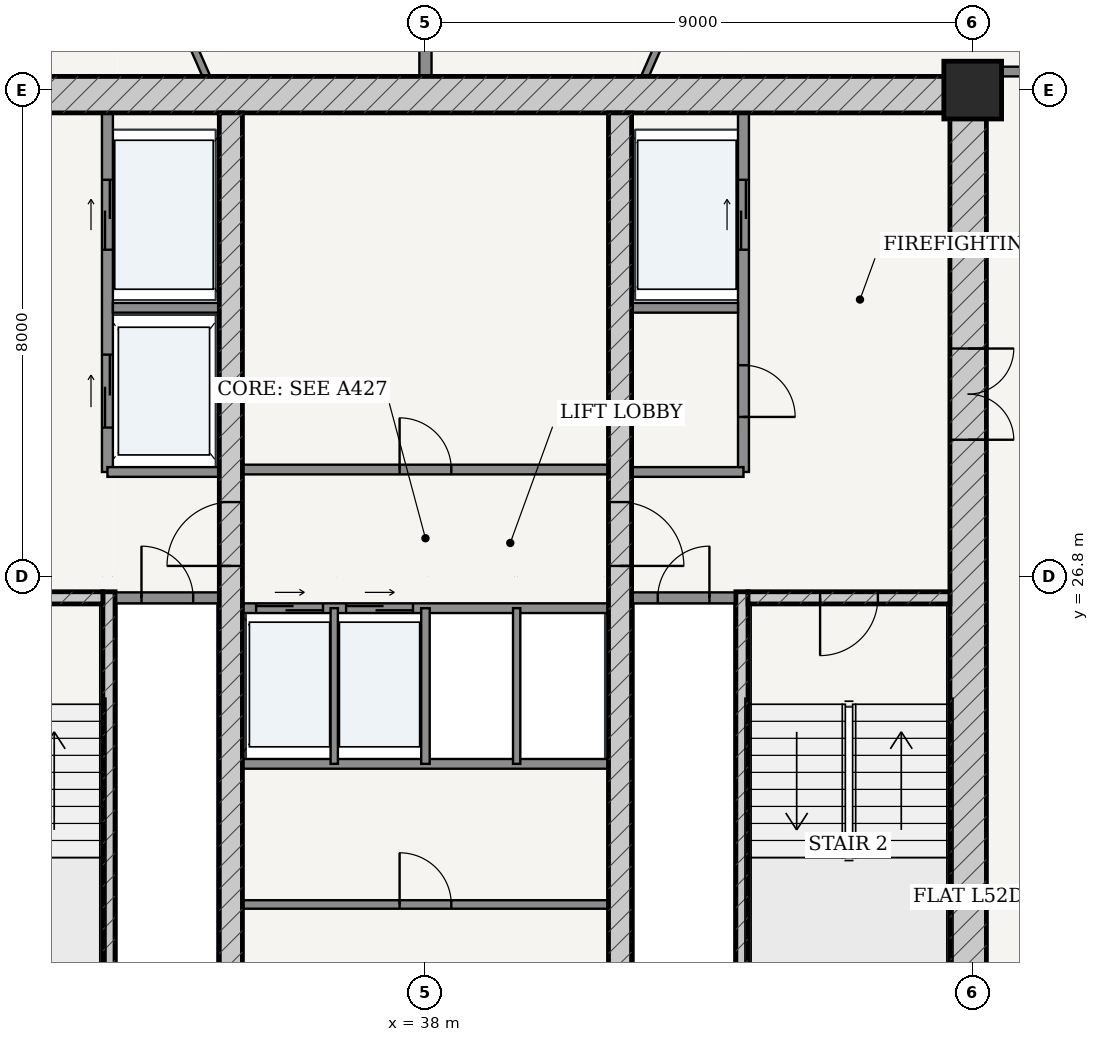
"""IFC4 building model, lengths in metres.
Left out: names, types, materials, properties, quantities, classifications, styles, units other than length and angle.
Written with IfcOpenShell. Run it as: python <this file> out.ifc"""

import sys

from ifc_helpers import new_model, si_unit, direction, frame, frame_2d, origin, origin_2d, place, context, subcontext, project, spatial, rectangle, extrude, source, transform, mapped, element, fill, save


model = new_model("IFC4")
c1 = context("Model", 3, precision=1e-05, world=origin(), true_north=direction((-0.2419218956, 0.970295726276)))
c2 = subcontext(c1, "Body", "Model", "MODEL_VIEW")
j1 = project(units=[si_unit("LENGTHUNIT", "METRE"), si_unit("PLANEANGLEUNIT", "RADIAN")], contexts=[c1])
p1 = place(None, origin())
s1 = spatial("IfcSite", under=j1, at=p1, CompositionType="ELEMENT")
p2 = place(p1, origin())
s2 = spatial("IfcBuilding", under=s1, at=p2, CompositionType="ELEMENT")
p3 = place(p2, frame((0.0, 0.0, 198.6)))
s3 = spatial("IfcBuildingStorey", under=s2, at=p3, CompositionType="ELEMENT", Elevation=198.6)
p4 = place(p3, frame((47.0, 34.8, 0.0), z_axis=(0.0, 0.0, 1.0), x_axis=(1.0, 0.0, 0.0)))
e1 = element("IfcColumn", 1, at=p4, inside=s3, PredefinedType="COLUMN", context=c2, shape_type="SweptSolid", body=[
    extrude(rectangle(XDim=0.95, YDim=0.95, at=origin_2d()), origin(), (0.0, 0.0, 1.0), 3.7),
])
p5 = place(p3, frame((28.775, 34.725, 0.0), z_axis=(0.0, 0.0, 1.0), x_axis=(1.0, 0.0, 0.0)))
e2 = element("IfcWall", 2, at=p5, inside=s3, PredefinedType="SHEAR", context=c2, shape_type="SweptSolid", body=[
    extrude(rectangle(XDim=18.45, YDim=0.6, at=frame_2d((9.225, 0.0))), origin(), (0.0, 0.0, 1.0), 3.435),
])
p6 = place(p3, frame((46.925, 19.175, 0.0), z_axis=(0.0, 0.0, 1.0), x_axis=(0.0, 1.0, 0.0)))
e3 = element("IfcWall", 3, at=p6, inside=s3, PredefinedType="SHEAR", context=c2, shape_type="SweptSolid", body=[
    extrude(rectangle(XDim=15.25, YDim=0.6, at=frame_2d((7.625, 0.0))), origin(), (0.0, 0.0, 1.0), 3.435),
])
p7 = place(p6, frame((9.875, 0.0, 0.0)))
e4 = element("IfcOpeningElement", 4, at=p7, cuts=e3, PredefinedType="OPENING", context=c2, shape_type="SweptSolid", body=[
    extrude(rectangle(XDim=1.5, YDim=2.2, at=frame_2d((0.75, 1.1))), frame((0.0, 0.31, 0.0), z_axis=(0.0, -1.0, 0.0), x_axis=(1.0, 0.0, 0.0)), (0.0, 0.0, 1.0), 0.62),
])
p8 = place(p3, frame((32.795, 19.175, 0.0), z_axis=(0.0, 0.0, 1.0), x_axis=(0.0, 1.0, 0.0)))
e5 = element("IfcWall", 5, at=p8, inside=s3, PredefinedType="SOLIDWALL", context=c2, shape_type="SweptSolid", body=[
    extrude(rectangle(XDim=7.375, YDim=0.2, at=frame_2d((3.688, 0.0))), origin(), (0.0, 0.0, 1.0), 3.435),
])
p9 = place(p3, frame((29.375, 26.45, 0.0), z_axis=(0.0, 0.0, 1.0), x_axis=(1.0, 0.0, 0.0)))
e6 = element("IfcWall", 6, at=p9, inside=s3, PredefinedType="SOLIDWALL", context=c2, shape_type="SweptSolid", body=[
    extrude(rectangle(XDim=3.32, YDim=0.2, at=frame_2d((1.66, 0.0))), origin(), (0.0, 0.0, 1.0), 3.435),
])
p10 = place(p9, frame((1.185, 0.0, 0.0)))
e7 = element("IfcOpeningElement", 7, at=p10, cuts=e6, PredefinedType="OPENING", context=c2, shape_type="SweptSolid", body=[
    extrude(rectangle(XDim=0.95, YDim=2.15, at=frame_2d((0.475, 1.075))), frame((0.0, 0.11, 0.0), z_axis=(0.0, -1.0, 0.0), x_axis=(1.0, 0.0, 0.0)), (0.0, 0.0, 1.0), 0.22),
])
p11 = place(p3, frame((43.205, 19.175, 0.0), z_axis=(0.0, 0.0, 1.0), x_axis=(0.0, 1.0, 0.0)))
e8 = element("IfcWall", 8, at=p11, inside=s3, PredefinedType="SOLIDWALL", context=c2, shape_type="SweptSolid", body=[
    extrude(rectangle(XDim=7.375, YDim=0.2, at=frame_2d((3.688, 0.0))), origin(), (0.0, 0.0, 1.0), 3.435),
])
p12 = place(p3, frame((43.305, 26.45, 0.0), z_axis=(0.0, 0.0, 1.0), x_axis=(1.0, 0.0, 0.0)))
e9 = element("IfcWall", 9, at=p12, inside=s3, PredefinedType="SOLIDWALL", context=c2, shape_type="SweptSolid", body=[
    extrude(rectangle(XDim=3.32, YDim=0.2, at=frame_2d((1.66, 0.0))), origin(), (0.0, 0.0, 1.0), 3.435),
])
p13 = place(p12, frame((1.185, 0.0, 0.0)))
e10 = element("IfcOpeningElement", 10, at=p13, cuts=e9, PredefinedType="OPENING", context=c2, shape_type="SweptSolid", body=[
    extrude(rectangle(XDim=0.95, YDim=2.15, at=frame_2d((0.475, 1.075))), frame((0.0, 0.11, 0.0), z_axis=(0.0, -1.0, 0.0), x_axis=(1.0, 0.0, 0.0)), (0.0, 0.0, 1.0), 0.22),
])
p14 = place(p3, frame((34.8, 19.175, 0.0), z_axis=(0.0, 0.0, 1.0), x_axis=(0.0, 1.0, 0.0)))
e11 = element("IfcWall", 11, at=p14, inside=s3, PredefinedType="SHEAR", context=c2, shape_type="SweptSolid", body=[
    extrude(rectangle(XDim=15.25, YDim=0.38, at=frame_2d((7.625, 0.0))), origin(), (0.0, 0.0, 1.0), 3.435),
])
p15 = place(p14, frame((7.8, 0.0, 0.0)))
e12 = element("IfcOpeningElement", 12, at=p15, cuts=e11, PredefinedType="OPENING", context=c2, shape_type="SweptSolid", body=[
    extrude(rectangle(XDim=1.05, YDim=2.15, at=frame_2d((0.525, 1.075))), frame((0.0, 0.2, 0.0), z_axis=(0.0, -1.0, 0.0), x_axis=(1.0, 0.0, 0.0)), (0.0, 0.0, 1.0), 0.4),
])
p16 = place(p3, frame((41.2, 19.175, 0.0), z_axis=(0.0, 0.0, 1.0), x_axis=(0.0, 1.0, 0.0)))
e13 = element("IfcWall", 13, at=p16, inside=s3, PredefinedType="SHEAR", context=c2, shape_type="SweptSolid", body=[
    extrude(rectangle(XDim=15.25, YDim=0.38, at=frame_2d((7.625, 0.0))), origin(), (0.0, 0.0, 1.0), 3.435),
])
p17 = place(p16, frame((7.8, 0.0, 0.0)))
e14 = element("IfcOpeningElement", 14, at=p17, cuts=e13, PredefinedType="OPENING", context=c2, shape_type="SweptSolid", body=[
    extrude(rectangle(XDim=1.05, YDim=2.15, at=frame_2d((0.525, 1.075))), frame((0.0, 0.2, 0.0), z_axis=(0.0, -1.0, 0.0), x_axis=(1.0, 0.0, 0.0)), (0.0, 0.0, 1.0), 0.4),
])
p18 = place(p3, frame((32.9, 26.45, 0.0), z_axis=(0.0, 0.0, 1.0), x_axis=(1.0, 0.0, 0.0)))
e15 = element("IfcWall", 15, at=p18, inside=s3, PredefinedType="PARTITIONING", context=c2, shape_type="SweptSolid", body=[
    extrude(rectangle(XDim=1.71, YDim=0.18, at=frame_2d((0.855, 0.0))), origin(), (0.0, 0.0, 1.0), 3.435),
])
p19 = place(p18, frame((0.43, 0.0, 0.0)))
e16 = element("IfcOpeningElement", 16, at=p19, cuts=e15, PredefinedType="OPENING", context=c2, shape_type="SweptSolid", body=[
    extrude(rectangle(XDim=0.85, YDim=2.1, at=frame_2d((0.425, 1.05))), frame((0.0, 0.1, 0.0), z_axis=(0.0, -1.0, 0.0), x_axis=(1.0, 0.0, 0.0)), (0.0, 0.0, 1.0), 0.2),
])
p20 = place(p3, frame((41.39, 26.45, 0.0), z_axis=(0.0, 0.0, 1.0), x_axis=(1.0, 0.0, 0.0)))
e17 = element("IfcWall", 17, at=p20, inside=s3, PredefinedType="PARTITIONING", context=c2, shape_type="SweptSolid", body=[
    extrude(rectangle(XDim=1.71, YDim=0.18, at=frame_2d((0.855, 0.0))), origin(), (0.0, 0.0, 1.0), 3.435),
])
p21 = place(p20, frame((0.43, 0.0, 0.0)))
e18 = element("IfcOpeningElement", 18, at=p21, cuts=e17, PredefinedType="OPENING", context=c2, shape_type="SweptSolid", body=[
    extrude(rectangle(XDim=0.85, YDim=2.1, at=frame_2d((0.425, 1.05))), frame((0.0, 0.1, 0.0), z_axis=(0.0, -1.0, 0.0), x_axis=(1.0, 0.0, 0.0)), (0.0, 0.0, 1.0), 0.2),
])
p22 = place(p3, frame((32.77, 28.52, 0.0), z_axis=(0.0, 0.0, 1.0), x_axis=(0.0, 1.0, 0.0)))
e19 = element("IfcWall", 19, at=p22, inside=s3, PredefinedType="PARTITIONING", context=c2, shape_type="SweptSolid", body=[
    extrude(rectangle(XDim=5.905, YDim=0.18, at=frame_2d((2.953, 0.0))), origin(), (0.0, 0.0, 1.0), 3.435),
])
p23 = place(p22, frame((3.655, 0.0, 0.0)))
e20 = element("IfcOpeningElement", 20, at=p23, cuts=e19, PredefinedType="OPENING", context=c2, shape_type="SweptSolid", body=[
    extrude(rectangle(XDim=1.15, YDim=2.2, at=frame_2d((0.575, 1.1))), frame((0.0, 0.1, 0.0), z_axis=(0.0, -1.0, 0.0), x_axis=(1.0, 0.0, 0.0)), (0.0, 0.0, 1.0), 0.2),
])
p24 = place(p22, frame((0.73, 0.0, 0.0)))
e21 = element("IfcOpeningElement", 21, at=p24, cuts=e19, PredefinedType="OPENING", context=c2, shape_type="SweptSolid", body=[
    extrude(rectangle(XDim=1.2, YDim=2.25, at=frame_2d((0.6, 1.125))), frame((0.0, 0.1, 0.0), z_axis=(0.0, -1.0, 0.0), x_axis=(1.0, 0.0, 0.0)), (0.0, 0.0, 1.0), 0.2),
])
p25 = place(p3, frame((32.86, 31.22, 0.0), z_axis=(0.0, 0.0, 1.0), x_axis=(1.0, 0.0, 0.0)))
e22 = element("IfcWall", 22, at=p25, inside=s3, PredefinedType="PARTITIONING", context=c2, shape_type="SweptSolid", body=[
    extrude(rectangle(XDim=1.75, YDim=0.16, at=frame_2d((0.875, 0.0))), origin(), (0.0, 0.0, 1.0), 3.435),
])
p26 = place(p3, frame((32.77, 28.52, 0.0), z_axis=(0.0, 0.0, 1.0), x_axis=(1.0, 0.0, 0.0)))
e23 = element("IfcWall", 23, at=p26, inside=s3, PredefinedType="PARTITIONING", context=c2, shape_type="SweptSolid", body=[
    extrude(rectangle(XDim=1.84, YDim=0.16, at=frame_2d((0.92, 0.0))), origin(), (0.0, 0.0, 1.0), 3.435),
])
p27 = place(p3, frame((43.23, 28.52, 0.0), z_axis=(0.0, 0.0, 1.0), x_axis=(0.0, 1.0, 0.0)))
e24 = element("IfcWall", 24, at=p27, inside=s3, PredefinedType="PARTITIONING", context=c2, shape_type="SweptSolid", body=[
    extrude(rectangle(XDim=5.905, YDim=0.18, at=frame_2d((2.953, 0.0))), origin(), (0.0, 0.0, 1.0), 3.435),
])
p28 = place(p27, frame((0.905, 0.0, 0.0)))
e25 = element("IfcOpeningElement", 25, at=p28, cuts=e24, PredefinedType="OPENING", context=c2, shape_type="SweptSolid", body=[
    extrude(rectangle(XDim=0.85, YDim=2.1, at=frame_2d((0.425, 1.05))), frame((0.0, 0.1, 0.0), z_axis=(0.0, -1.0, 0.0), x_axis=(1.0, 0.0, 0.0)), (0.0, 0.0, 1.0), 0.2),
])
p29 = place(p27, frame((3.655, 0.0, 0.0)))
e26 = element("IfcOpeningElement", 26, at=p29, cuts=e24, PredefinedType="OPENING", context=c2, shape_type="SweptSolid", body=[
    extrude(rectangle(XDim=1.15, YDim=2.2, at=frame_2d((0.575, 1.1))), frame((0.0, 0.1, 0.0), z_axis=(0.0, -1.0, 0.0), x_axis=(1.0, 0.0, 0.0)), (0.0, 0.0, 1.0), 0.2),
])
p30 = place(p3, frame((41.39, 31.22, 0.0), z_axis=(0.0, 0.0, 1.0), x_axis=(1.0, 0.0, 0.0)))
e27 = element("IfcWall", 27, at=p30, inside=s3, PredefinedType="PARTITIONING", context=c2, shape_type="SweptSolid", body=[
    extrude(rectangle(XDim=1.75, YDim=0.16, at=frame_2d((0.875, 0.0))), origin(), (0.0, 0.0, 1.0), 3.435),
])
p31 = place(p3, frame((41.39, 28.52, 0.0), z_axis=(0.0, 0.0, 1.0), x_axis=(1.0, 0.0, 0.0)))
e28 = element("IfcWall", 28, at=p31, inside=s3, PredefinedType="PARTITIONING", context=c2, shape_type="SweptSolid", body=[
    extrude(rectangle(XDim=1.84, YDim=0.16, at=frame_2d((0.92, 0.0))), origin(), (0.0, 0.0, 1.0), 3.435),
])
p32 = place(p3, frame((34.99, 28.56, 0.0), z_axis=(0.0, 0.0, 1.0), x_axis=(1.0, 0.0, 0.0)))
e29 = element("IfcWall", 29, at=p32, inside=s3, PredefinedType="PARTITIONING", context=c2, shape_type="SweptSolid", body=[
    extrude(rectangle(XDim=6.02, YDim=0.16, at=frame_2d((3.01, 0.0))), origin(), (0.0, 0.0, 1.0), 3.435),
])
p33 = place(p32, frame((2.585, 0.0, 0.0)))
e30 = element("IfcOpeningElement", 30, at=p33, cuts=e29, PredefinedType="OPENING", context=c2, shape_type="SweptSolid", body=[
    extrude(rectangle(XDim=0.85, YDim=2.1, at=frame_2d((0.425, 1.05))), frame((0.0, 0.09, 0.0), z_axis=(0.0, -1.0, 0.0), x_axis=(1.0, 0.0, 0.0)), (0.0, 0.0, 1.0), 0.18),
])
p34 = place(p3, frame((34.99, 26.28, 0.0), z_axis=(0.0, 0.0, 1.0), x_axis=(1.0, 0.0, 0.0)))
e31 = element("IfcWall", 31, at=p34, inside=s3, PredefinedType="PARTITIONING", context=c2, shape_type="SweptSolid", body=[
    extrude(rectangle(XDim=6.02, YDim=0.16, at=frame_2d((3.01, 0.0))), origin(), (0.0, 0.0, 1.0), 3.435),
])
p35 = place(p34, frame((0.225, 0.0, 0.0)))
e32 = element("IfcOpeningElement", 32, at=p35, cuts=e31, PredefinedType="OPENING", context=c2, shape_type="SweptSolid", body=[
    extrude(rectangle(XDim=1.1, YDim=2.2, at=frame_2d((0.55, 1.1))), frame((0.0, 0.09, 0.0), z_axis=(0.0, -1.0, 0.0), x_axis=(1.0, 0.0, 0.0)), (0.0, 0.0, 1.0), 0.18),
])
p36 = place(p34, frame((1.705, 0.0, 0.0)))
e33 = element("IfcOpeningElement", 33, at=p36, cuts=e31, PredefinedType="OPENING", context=c2, shape_type="SweptSolid", body=[
    extrude(rectangle(XDim=1.1, YDim=2.2, at=frame_2d((0.55, 1.1))), frame((0.0, 0.09, 0.0), z_axis=(0.0, -1.0, 0.0), x_axis=(1.0, 0.0, 0.0)), (0.0, 0.0, 1.0), 0.18),
])
p37 = place(p3, frame((34.99, 23.72, 0.0), z_axis=(0.0, 0.0, 1.0), x_axis=(1.0, 0.0, 0.0)))
e34 = element("IfcWall", 34, at=p37, inside=s3, PredefinedType="PARTITIONING", context=c2, shape_type="SweptSolid", body=[
    extrude(rectangle(XDim=6.02, YDim=0.16, at=frame_2d((3.01, 0.0))), origin(), (0.0, 0.0, 1.0), 3.435),
])
p38 = place(p3, frame((36.5, 23.72, 0.0), z_axis=(0.0, 0.0, 1.0), x_axis=(0.0, 1.0, 0.0)))
e35 = element("IfcWall", 35, at=p38, inside=s3, PredefinedType="PARTITIONING", context=c2, shape_type="SweptSolid", body=[
    extrude(rectangle(XDim=2.56, YDim=0.12, at=frame_2d((1.28, 0.0))), origin(), (0.0, 0.0, 1.0), 3.435),
])
p39 = place(p3, frame((38.0, 23.72, 0.0), z_axis=(0.0, 0.0, 1.0), x_axis=(0.0, 1.0, 0.0)))
e36 = element("IfcWall", 36, at=p39, inside=s3, PredefinedType="PARTITIONING", context=c2, shape_type="SweptSolid", body=[
    extrude(rectangle(XDim=2.56, YDim=0.14, at=frame_2d((1.28, 0.0))), origin(), (0.0, 0.0, 1.0), 3.435),
])
p40 = place(p3, frame((39.5, 23.72, 0.0), z_axis=(0.0, 0.0, 1.0), x_axis=(0.0, 1.0, 0.0)))
e37 = element("IfcWall", 37, at=p40, inside=s3, PredefinedType="PARTITIONING", context=c2, shape_type="SweptSolid", body=[
    extrude(rectangle(XDim=2.56, YDim=0.12, at=frame_2d((1.28, 0.0))), origin(), (0.0, 0.0, 1.0), 3.435),
])
p41 = place(p3, frame((34.99, 21.407, 0.0), z_axis=(0.0, 0.0, 1.0), x_axis=(1.0, 0.0, 0.0)))
e38 = element("IfcWall", 38, at=p41, inside=s3, PredefinedType="PARTITIONING", context=c2, shape_type="SweptSolid", body=[
    extrude(rectangle(XDim=6.02, YDim=0.14, at=frame_2d((3.01, 0.0))), origin(), (0.0, 0.0, 1.0), 3.435),
])
p42 = place(p41, frame((2.585, 0.0, 0.0)))
e39 = element("IfcOpeningElement", 39, at=p42, cuts=e38, PredefinedType="OPENING", context=c2, shape_type="SweptSolid", body=[
    extrude(rectangle(XDim=0.85, YDim=2.1, at=frame_2d((0.425, 1.05))), frame((0.0, 0.08, 0.0), z_axis=(0.0, -1.0, 0.0), x_axis=(1.0, 0.0, 0.0)), (0.0, 0.0, 1.0), 0.16),
])
p43 = place(p3, frame((47.225, 35.105, 0.0), z_axis=(0.0, 0.0, 1.0), x_axis=(1.0, 0.0, 0.0)))
e40 = element("IfcWall", 40, at=p43, inside=s3, PredefinedType="PARTITIONING", context=c2, shape_type="SweptSolid", body=[
    extrude(rectangle(XDim=1.93, YDim=0.16, at=frame_2d((0.965, 0.0))), origin(), (0.0, 0.0, 1.0), 3.435),
])
p44 = place(p43, frame((0.58, 0.0, 0.0)))
e41 = element("IfcOpeningElement", 41, at=p44, cuts=e40, PredefinedType="OPENING", context=c2, shape_type="SweptSolid", body=[
    extrude(rectangle(XDim=0.98, YDim=2.2, at=frame_2d((0.49, 1.1))), frame((0.0, 0.09, 0.0), z_axis=(0.0, -1.0, 0.0), x_axis=(1.0, 0.0, 0.0)), (0.0, 0.0, 1.0), 0.18),
])
p45 = place(p3, frame((41.61, 35.027, 0.0), z_axis=(0.0, 0.0, 1.0), x_axis=(0.401859508224, 0.915701335398, 0.0)))
e42 = element("IfcWall", 42, at=p45, inside=s3, PredefinedType="PARTITIONING", context=c2, shape_type="SweptSolid", body=[
    extrude(rectangle(XDim=2.83, YDim=0.12, at=frame_2d((1.415, 0.0))), origin(), (0.0, 0.0, 1.0), 3.435),
])
p46 = place(p45, frame((0.965, 0.0, 0.0)))
e43 = element("IfcOpeningElement", 43, at=p46, cuts=e42, PredefinedType="OPENING", context=c2, shape_type="SweptSolid", body=[
    extrude(rectangle(XDim=0.9, YDim=2.15, at=frame_2d((0.45, 1.075))), frame((0.0, 0.07, 0.0), z_axis=(0.0, -1.0, 0.0), x_axis=(1.0, 0.0, 0.0)), (0.0, 0.0, 1.0), 0.14),
])
p47 = place(p3, frame((38.0, 35.027, 0.0), z_axis=(0.0, 0.0, 1.0), x_axis=(0.0, 1.0, 0.0)))
e44 = element("IfcWall", 44, at=p47, inside=s3, PredefinedType="PARTITIONING", context=c2, shape_type="SweptSolid", body=[
    extrude(rectangle(XDim=11.413, YDim=0.2, at=frame_2d((5.707, 0.0))), origin(), (0.0, 0.0, 1.0), 2.52),
])
p48 = place(p3, frame((34.397, 35.027, 0.0), z_axis=(0.0, 0.0, 1.0), x_axis=(-0.401135725485, 0.916018629581, 0.0)))
e45 = element("IfcWall", 45, at=p48, inside=s3, PredefinedType="PARTITIONING", context=c2, shape_type="SweptSolid", body=[
    extrude(rectangle(XDim=2.829, YDim=0.12, at=frame_2d((1.415, 0.0))), origin(), (0.0, 0.0, 1.0), 3.435),
])
p49 = place(p48, frame((0.985, 0.0, 0.0)))
e46 = element("IfcOpeningElement", 46, at=p49, cuts=e45, PredefinedType="OPENING", context=c2, shape_type="SweptSolid", body=[
    extrude(rectangle(XDim=0.86, YDim=2.15, at=frame_2d((0.43, 1.075))), frame((0.0, 0.07, 0.0), z_axis=(0.0, -1.0, 0.0), x_axis=(1.0, 0.0, 0.0)), (0.0, 0.0, 1.0), 0.14),
])
m1 = source(origin(), c2, "Body", "SweptSolid", [
    extrude(rectangle(XDim=1.5, YDim=2.2, at=frame_2d((0.75, 1.1))), frame((0.0, 0.025, 0.0), z_axis=(0.0, -1.0, 0.0), x_axis=(1.0, 0.0, 0.0)), (0.0, 0.0, 1.0), 0.05),
])
p50 = place(p7, frame((1.5, 0.0, 0.0), z_axis=(0.0, 0.0, 1.0), x_axis=(-1.0, 0.0, 0.0)))
e47 = element("IfcDoor", 47, at=p50, inside=s3, OperationType="DOUBLE_DOOR_SINGLE_SWING", PredefinedType="DOOR", context=c2, shape_type="MappedRepresentation", body=[
    mapped(m1, transform((0.0, 0.0, 0.0), scale=1.0)),
])
fill(e4, e47)
m2 = source(origin(), c2, "Body", "SweptSolid", [
    extrude(rectangle(XDim=1.05, YDim=2.15, at=frame_2d((0.525, 1.075))), frame((0.0, 0.025, 0.0), z_axis=(0.0, -1.0, 0.0), x_axis=(1.0, 0.0, 0.0)), (0.0, 0.0, 1.0), 0.05),
])
p51 = place(p15, origin())
e48 = element("IfcDoor", 48, at=p51, inside=s3, OperationType="SINGLE_SWING_LEFT", PredefinedType="DOOR", context=c2, shape_type="MappedRepresentation", body=[
    mapped(m2, transform((0.0, 0.0, 0.0), scale=1.0)),
])
fill(e12, e48)
p52 = place(p17, frame((1.05, 0.0, 0.0), z_axis=(0.0, 0.0, 1.0), x_axis=(-1.0, 0.0, 0.0)))
e49 = element("IfcDoor", 49, at=p52, inside=s3, OperationType="SINGLE_SWING_RIGHT", PredefinedType="DOOR", context=c2, shape_type="MappedRepresentation", body=[
    mapped(m2, transform((0.0, 0.0, 0.0), scale=1.0)),
])
fill(e14, e49)
m3 = source(origin(), c2, "Body", "SweptSolid", [
    extrude(rectangle(XDim=0.95, YDim=2.15, at=frame_2d((0.475, 1.075))), frame((0.0, 0.025, 0.0), z_axis=(0.0, -1.0, 0.0), x_axis=(1.0, 0.0, 0.0)), (0.0, 0.0, 1.0), 0.05),
])
p53 = place(p13, frame((0.95, 0.0, 0.0), z_axis=(0.0, 0.0, 1.0), x_axis=(-1.0, 0.0, 0.0)))
e50 = element("IfcDoor", 50, at=p53, inside=s3, OperationType="SINGLE_SWING_RIGHT", PredefinedType="DOOR", context=c2, shape_type="MappedRepresentation", body=[
    mapped(m3, transform((0.0, 0.0, 0.0), scale=1.0)),
])
fill(e10, e50)
m4 = source(origin(), c2, "Body", "SweptSolid", [
    extrude(rectangle(XDim=0.85, YDim=2.1, at=frame_2d((0.425, 1.05))), frame((0.0, 0.025, 0.0), z_axis=(0.0, -1.0, 0.0), x_axis=(1.0, 0.0, 0.0)), (0.0, 0.0, 1.0), 0.05),
])
p54 = place(p19, origin())
e51 = element("IfcDoor", 51, at=p54, inside=s3, OperationType="SINGLE_SWING_LEFT", PredefinedType="DOOR", context=c2, shape_type="MappedRepresentation", body=[
    mapped(m4, transform((0.0, 0.0, 0.0), scale=1.0)),
])
fill(e16, e51)
p55 = place(p21, origin())
e52 = element("IfcDoor", 52, at=p55, inside=s3, OperationType="SINGLE_SWING_RIGHT", PredefinedType="DOOR", context=c2, shape_type="MappedRepresentation", body=[
    mapped(m4, transform((0.0, 0.0, 0.0), scale=1.0)),
])
fill(e18, e52)
p56 = place(p28, frame((0.85, 0.0, 0.0), z_axis=(0.0, 0.0, 1.0), x_axis=(-1.0, 0.0, 0.0)))
e53 = element("IfcDoor", 53, at=p56, inside=s3, OperationType="SINGLE_SWING_RIGHT", PredefinedType="DOOR", context=c2, shape_type="MappedRepresentation", body=[
    mapped(m4, transform((0.0, 0.0, 0.0), scale=1.0)),
])
fill(e25, e53)
p57 = place(p33, origin())
e54 = element("IfcDoor", 54, at=p57, inside=s3, OperationType="SINGLE_SWING_LEFT", PredefinedType="DOOR", context=c2, shape_type="MappedRepresentation", body=[
    mapped(m4, transform((0.0, 0.0, 0.0), scale=1.0)),
])
fill(e30, e54)
p58 = place(p42, origin())
e55 = element("IfcDoor", 55, at=p58, inside=s3, OperationType="SINGLE_SWING_LEFT", PredefinedType="DOOR", context=c2, shape_type="MappedRepresentation", body=[
    mapped(m4, transform((0.0, 0.0, 0.0), scale=1.0)),
])
fill(e39, e55)
m5 = source(origin(), c2, "Body", "SweptSolid", [
    extrude(rectangle(XDim=1.15, YDim=2.2, at=frame_2d((0.575, 1.1))), frame((0.0, 0.025, 0.0), z_axis=(0.0, -1.0, 0.0), x_axis=(1.0, 0.0, 0.0)), (0.0, 0.0, 1.0), 0.05),
])
p59 = place(p23, origin())
e56 = element("IfcDoor", 56, at=p59, inside=s3, OperationType="DOUBLE_DOOR_SLIDING", PredefinedType="DOOR", context=c2, shape_type="MappedRepresentation", body=[
    mapped(m5, transform((0.0, 0.0, 0.0), scale=1.0)),
])
fill(e20, e56)
p60 = place(p29, origin())
e57 = element("IfcDoor", 57, at=p60, inside=s3, OperationType="DOUBLE_DOOR_SLIDING", PredefinedType="DOOR", context=c2, shape_type="MappedRepresentation", body=[
    mapped(m5, transform((0.0, 0.0, 0.0), scale=1.0)),
])
fill(e26, e57)
m6 = source(origin(), c2, "Body", "SweptSolid", [
    extrude(rectangle(XDim=1.2, YDim=2.25, at=frame_2d((0.6, 1.125))), frame((0.0, 0.025, 0.0), z_axis=(0.0, -1.0, 0.0), x_axis=(1.0, 0.0, 0.0)), (0.0, 0.0, 1.0), 0.05),
])
p61 = place(p24, origin())
e58 = element("IfcDoor", 58, at=p61, inside=s3, OperationType="DOUBLE_DOOR_SLIDING", PredefinedType="DOOR", context=c2, shape_type="MappedRepresentation", body=[
    mapped(m6, transform((0.0, 0.0, 0.0), scale=1.0)),
])
fill(e21, e58)
m7 = source(origin(), c2, "Body", "SweptSolid", [
    extrude(rectangle(XDim=1.1, YDim=2.2, at=frame_2d((0.55, 1.1))), frame((0.0, 0.025, 0.0), z_axis=(0.0, -1.0, 0.0), x_axis=(1.0, 0.0, 0.0)), (0.0, 0.0, 1.0), 0.05),
])
p62 = place(p35, origin())
e59 = element("IfcDoor", 59, at=p62, inside=s3, OperationType="DOUBLE_DOOR_SLIDING", PredefinedType="DOOR", context=c2, shape_type="MappedRepresentation", body=[
    mapped(m7, transform((0.0, 0.0, 0.0), scale=1.0)),
])
fill(e32, e59)
p63 = place(p36, origin())
e60 = element("IfcDoor", 60, at=p63, inside=s3, OperationType="DOUBLE_DOOR_SLIDING", PredefinedType="DOOR", context=c2, shape_type="MappedRepresentation", body=[
    mapped(m7, transform((0.0, 0.0, 0.0), scale=1.0)),
])
fill(e33, e60)
save(model, sys.argv[1])
